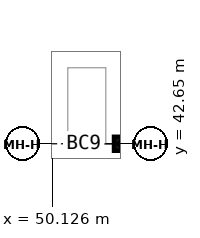
"""IFC4 building model, lengths in metres.
Left out: names, types, materials, properties, quantities, classifications, styles, units other than length and angle.
Written with IfcOpenShell. Run it as: python <this file> out.ifc"""

import sys

from ifc_helpers import new_model, si_unit, direction, frame, origin, origin_2d, place, context, subcontext, project, spatial, rectangle, extrude, source, transform, mapped, element, save


model = new_model("IFC4")
c1 = context("Model", 3, precision=1e-05, world=origin(), true_north=direction((0.0, 1.0)))
c2 = subcontext(c1, "Body", "Model", "MODEL_VIEW")
j1 = project(units=[si_unit("LENGTHUNIT", "METRE"), si_unit("PLANEANGLEUNIT", "RADIAN")], contexts=[c1])
p1 = place(None, origin())
s1 = spatial("IfcSite", under=j1, at=p1, CompositionType="ELEMENT")
p2 = place(p1, origin())
s2 = spatial("IfcBuilding", under=s1, at=p2, CompositionType="ELEMENT")
p3 = place(p2, frame((0.0, 0.0, -4.5)))
s3 = spatial("IfcBuildingStorey", under=s2, at=p3, CompositionType="ELEMENT", Elevation=-4.5)
m1 = source(origin(), c2, "Body", "SweptSolid", [
    extrude(rectangle(XDim=0.9, YDim=0.9, at=origin_2d()), origin(), (0.0, 0.0, 1.0), 4.5),
])
p4 = place(p3, frame((54.65, 42.65, 0.0), z_axis=(0.0, 0.0, 1.0), x_axis=(1.0, 0.0, 0.0)))
e1 = element("IfcColumn", 1, at=p4, inside=s3, PredefinedType="COLUMN", context=c2, shape_type="MappedRepresentation", body=[
    mapped(m1, transform((0.0, 0.0, 0.0))),
])
save(model, sys.argv[1])
